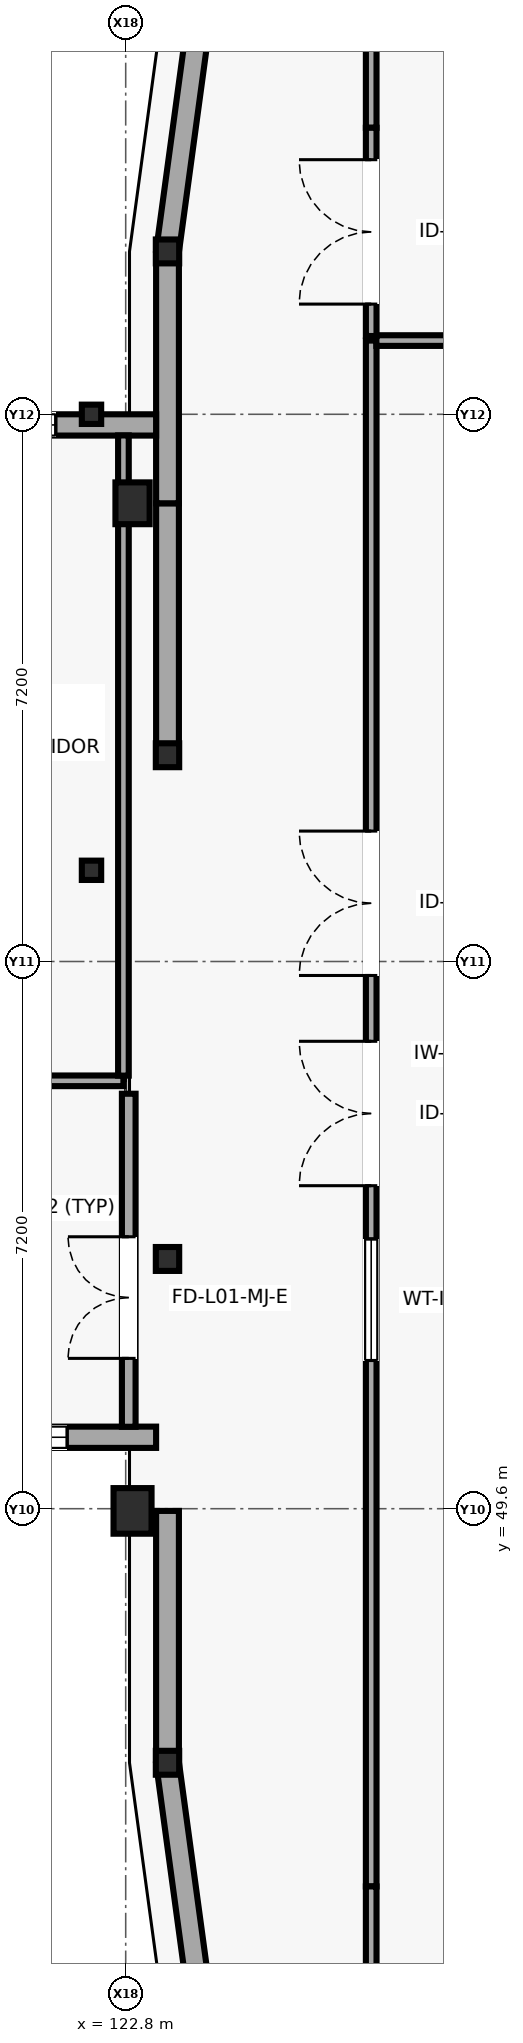
"""IFC4 building model, lengths in metres.
Left out: names, types, materials, properties, quantities, classifications, styles, units other than length and angle.
Written with IfcOpenShell. Run it as: python <this file> out.ifc"""

import sys

from ifc_helpers import new_model, si_unit, direction, frame, frame_2d, origin, origin_2d, place, context, subcontext, project, spatial, rectangle, i_section, extrude, element, fill, save


model = new_model("IFC4")
c1 = context("Model", 3, precision=1e-05, world=origin(), true_north=direction((0.0, 1.0)))
c2 = subcontext(c1, "Body", "Model", "MODEL_VIEW")
j1 = project(units=[si_unit("LENGTHUNIT", "METRE"), si_unit("PLANEANGLEUNIT", "RADIAN")], contexts=[c1])
p1 = place(None, origin())
s1 = spatial("IfcSite", under=j1, at=p1, CompositionType="ELEMENT")
p2 = place(p1, origin())
s2 = spatial("IfcBuilding", under=s1, at=p2, CompositionType="ELEMENT")
p3 = place(p2, frame((0.0, 0.0, 4.2)))
s3 = spatial("IfcBuildingStorey", under=s2, at=p3, CompositionType="ELEMENT", Elevation=4.2)
for number, where, z_axis, x_axis in (
    (1, (122.35, 58.0, 0.0), (0.0, 0.0, 1.0), (1.0, 0.0, 0.0)),
    (2, (122.35, 64.0, 0.0), (0.0, 0.0, 1.0), (1.0, 0.0, 0.0)),
):
    element("IfcColumn", number, at=place(p3, frame(where, z_axis=z_axis, x_axis=x_axis)), inside=s3, PredefinedType="COLUMN", context=c2, shape_type="SweptSolid", body=[
        extrude(i_section(OverallWidth=0.255, OverallDepth=0.254, WebThickness=0.009, FlangeThickness=0.014, FilletRadius=0.013, at=origin_2d()), origin(), (0.0, 0.0, 1.0), 4.0),
    ])
p4 = place(p3, frame((122.89, 49.571, 0.0), z_axis=(0.0, 0.0, 1.0), x_axis=(1.0, 0.0, 0.0)))
e3 = element("IfcColumn", 3, at=p4, inside=s3, PredefinedType="PILASTER", context=c2, shape_type="SweptSolid", body=[
    extrude(rectangle(XDim=0.5, YDim=0.6, at=origin_2d()), origin(), (0.0, 0.0, 1.0), 4.0),
])
p5 = place(p3, frame((122.89, 62.829, 0.0), z_axis=(0.0, 0.0, 1.0), x_axis=(1.0, 0.0, 0.0)))
e4 = element("IfcColumn", 4, at=p5, inside=s3, PredefinedType="PILASTER", context=c2, shape_type="SweptSolid", body=[
    extrude(rectangle(XDim=0.45, YDim=0.55, at=origin_2d()), origin(), (0.0, 0.0, 1.0), 4.0),
])
for number, where, z_axis, x_axis in (
    (5, (123.35, 46.257, 0.0), (0.0, 0.0, 1.0), (1.0, 0.0, 0.0)),
    (6, (123.35, 52.886, 0.0), (0.0, 0.0, 1.0), (1.0, 0.0, 0.0)),
    (7, (123.35, 59.514, 0.0), (0.0, 0.0, 1.0), (1.0, 0.0, 0.0)),
    (8, (123.35, 66.143, 0.0), (0.0, 0.0, 1.0), (1.0, 0.0, 0.0)),
):
    element("IfcColumn", number, at=place(p3, frame(where, z_axis=z_axis, x_axis=x_axis)), inside=s3, PredefinedType="COLUMN", context=c2, shape_type="SweptSolid", body=[
        extrude(i_section(OverallWidth=0.307, OverallDepth=0.314, WebThickness=0.012, FlangeThickness=0.019, FilletRadius=0.015, at=origin_2d()), origin(), (0.0, 0.0, 1.0), 4.0),
    ])
p6 = place(p3, frame((123.35, 46.257, 0.0), z_axis=(0.0, 0.0, 1.0), x_axis=(0.134539839792, -0.990908185206, 0.0)))
e9 = element("IfcWall", 9, at=p6, inside=s3, PredefinedType="SOLIDWALL", context=c2, shape_type="SweptSolid", body=[
    extrude(rectangle(XDim=3.344, YDim=0.3, at=frame_2d((1.672, 0.0))), origin(), (0.0, 0.0, 1.0), 3.745),
])
p7 = place(p3, frame((123.35, 49.571, 0.0), z_axis=(0.0, 0.0, 1.0), x_axis=(0.0, -1.0, 0.0)))
e10 = element("IfcWall", 10, at=p7, inside=s3, PredefinedType="SOLIDWALL", context=c2, shape_type="SweptSolid", body=[
    extrude(rectangle(XDim=3.314, YDim=0.3, at=frame_2d((1.657, 0.0))), origin(), (0.0, 0.0, 1.0), 3.48),
])
p8 = place(p3, frame((123.35, 62.829, 0.0), z_axis=(0.0, 0.0, 1.0), x_axis=(0.0, -1.0, 0.0)))
e11 = element("IfcWall", 11, at=p8, inside=s3, PredefinedType="SOLIDWALL", context=c2, shape_type="SweptSolid", body=[
    extrude(rectangle(XDim=3.315, YDim=0.3, at=frame_2d((1.658, 0.0))), origin(), (0.0, 0.0, 1.0), 3.48),
])
p9 = place(p3, frame((123.35, 66.143, 0.0), z_axis=(0.0, 0.0, 1.0), x_axis=(0.0, -1.0, 0.0)))
e12 = element("IfcWall", 12, at=p9, inside=s3, PredefinedType="SOLIDWALL", context=c2, shape_type="SweptSolid", body=[
    extrude(rectangle(XDim=3.314, YDim=0.3, at=frame_2d((1.657, 0.0))), origin(), (0.0, 0.0, 1.0), 3.48),
])
p10 = place(p3, frame((123.8, 69.457, 0.0), z_axis=(0.0, 0.0, 1.0), x_axis=(-0.134539839792, -0.990908185206, 0.0)))
e13 = element("IfcWall", 13, at=p10, inside=s3, PredefinedType="SOLIDWALL", context=c2, shape_type="SweptSolid", body=[
    extrude(rectangle(XDim=3.344, YDim=0.3, at=frame_2d((1.672, 0.0))), origin(), (0.0, 0.0, 1.0), 3.735),
])
p11 = place(p3, frame((115.32, 50.54, 0.0), z_axis=(0.0, 0.0, 1.0), x_axis=(1.0, 0.0, 0.0)))
e14 = element("IfcWall", 14, at=p11, inside=s3, PredefinedType="SOLIDWALL", context=c2, shape_type="SweptSolid", body=[
    extrude(rectangle(XDim=7.88, YDim=0.28, at=frame_2d((3.94, 0.0))), origin(), (0.0, 0.0, 1.0), 3.78),
])
p12 = place(p11, frame((1.445, 0.0, 1.05)))
e15 = element("IfcOpeningElement", 15, at=p12, cuts=e14, PredefinedType="OPENING", context=c2, shape_type="SweptSolid", body=[
    extrude(rectangle(XDim=1.05, YDim=1.3, at=frame_2d((0.525, 0.65))), frame((0.0, 0.15, 0.0), z_axis=(0.0, -1.0, 0.0), x_axis=(1.0, 0.0, 0.0)), (0.0, 0.0, 1.0), 0.3),
])
p13 = place(p11, frame((5.11, 0.0, 1.05)))
e16 = element("IfcOpeningElement", 16, at=p13, cuts=e14, PredefinedType="OPENING", context=c2, shape_type="SweptSolid", body=[
    extrude(rectangle(XDim=1.6, YDim=1.35, at=frame_2d((0.8, 0.675))), frame((0.0, 0.15, 0.0), z_axis=(0.0, -1.0, 0.0), x_axis=(1.0, 0.0, 0.0)), (0.0, 0.0, 1.0), 0.3),
])
p14 = place(p3, frame((123.2, 63.86, 0.0), z_axis=(0.0, 0.0, 1.0), x_axis=(-1.0, 0.0, 0.0)))
e17 = element("IfcWall", 17, at=p14, inside=s3, PredefinedType="SOLIDWALL", context=c2, shape_type="SweptSolid", body=[
    extrude(rectangle(XDim=7.88, YDim=0.28, at=frame_2d((3.94, 0.0))), origin(), (0.0, 0.0, 1.0), 3.16),
])
p15 = place(p14, frame((1.32, 0.0, 1.05)))
e18 = element("IfcOpeningElement", 18, at=p15, cuts=e17, PredefinedType="OPENING", context=c2, shape_type="SweptSolid", body=[
    extrude(rectangle(XDim=2.2, YDim=1.35, at=frame_2d((1.1, 0.675))), frame((0.0, 0.15, 0.0), z_axis=(0.0, -1.0, 0.0), x_axis=(1.0, 0.0, 0.0)), (0.0, 0.0, 1.0), 0.3),
])
p16 = place(p14, frame((5.31, 0.0, 1.05)))
e19 = element("IfcOpeningElement", 19, at=p16, cuts=e17, PredefinedType="OPENING", context=c2, shape_type="SweptSolid", body=[
    extrude(rectangle(XDim=1.2, YDim=0.9, at=frame_2d((0.6, 0.45))), frame((0.0, 0.15, 0.0), z_axis=(0.0, -1.0, 0.0), x_axis=(1.0, 0.0, 0.0)), (0.0, 0.0, 1.0), 0.3),
])
p17 = place(p3, frame((122.84, 50.678, 0.0), z_axis=(0.0, 0.0, 1.0), x_axis=(0.0, 1.0, 0.0)))
e20 = element("IfcWall", 20, at=p17, inside=s3, PredefinedType="PARTITIONING", context=c2, shape_type="SweptSolid", body=[
    extrude(rectangle(XDim=4.382, YDim=0.18, at=frame_2d((2.191, 0.0))), origin(), (0.0, 0.0, 1.0), 3.78),
])
p18 = place(p17, frame((0.9, 0.0, 0.0)))
e21 = element("IfcOpeningElement", 21, at=p18, cuts=e20, PredefinedType="OPENING", context=c2, shape_type="SweptSolid", body=[
    extrude(rectangle(XDim=1.6, YDim=2.25, at=frame_2d((0.8, 1.125))), frame((0.0, 0.1, 0.0), z_axis=(0.0, -1.0, 0.0), x_axis=(1.0, 0.0, 0.0)), (0.0, 0.0, 1.0), 0.2),
])
p19 = place(p3, frame((126.03, 64.97, 0.0), z_axis=(0.0, 0.0, 1.0), x_axis=(0.0, -1.0, 0.0)))
e22 = element("IfcWall", 22, at=p19, inside=s3, PredefinedType="PARTITIONING", context=c2, shape_type="SweptSolid", body=[
    extrude(rectangle(XDim=20.34, YDim=0.14, at=frame_2d((10.17, 0.0))), origin(), (0.0, 0.0, 1.0), 3.78),
])
p20 = place(p19, frame((9.22, 0.0, 0.0)))
e23 = element("IfcOpeningElement", 23, at=p20, cuts=e22, PredefinedType="OPENING", context=c2, shape_type="SweptSolid", body=[
    extrude(rectangle(XDim=1.9, YDim=2.5, at=frame_2d((0.95, 1.25))), frame((0.0, 0.08, 0.0), z_axis=(0.0, -1.0, 0.0), x_axis=(1.0, 0.0, 0.0)), (0.0, 0.0, 1.0), 0.16),
])
p21 = place(p19, frame((6.454, 0.0, 0.0)))
e24 = element("IfcOpeningElement", 24, at=p21, cuts=e22, PredefinedType="OPENING", context=c2, shape_type="SweptSolid", body=[
    extrude(rectangle(XDim=1.9, YDim=2.5, at=frame_2d((0.95, 1.25))), frame((0.0, 0.08, 0.0), z_axis=(0.0, -1.0, 0.0), x_axis=(1.0, 0.0, 0.0)), (0.0, 0.0, 1.0), 0.16),
])
p22 = place(p19, frame((11.82, 0.0, 1.05)))
e25 = element("IfcOpeningElement", 25, at=p22, cuts=e22, PredefinedType="OPENING", context=c2, shape_type="SweptSolid", body=[
    extrude(rectangle(XDim=1.6, YDim=1.1, at=frame_2d((0.8, 0.55))), frame((0.0, 0.08, 0.0), z_axis=(0.0, -1.0, 0.0), x_axis=(1.0, 0.0, 0.0)), (0.0, 0.0, 1.0), 0.16),
])
p23 = place(p3, frame((126.03, 44.63, 0.0), z_axis=(0.0, 0.0, 1.0), x_axis=(0.0, -1.0, 0.0)))
e26 = element("IfcWall", 26, at=p23, inside=s3, PredefinedType="PARTITIONING", context=c2, shape_type="SweptSolid", body=[
    extrude(rectangle(XDim=8.664, YDim=0.14, at=frame_2d((4.332, 0.0))), origin(), (0.0, 0.0, 1.0), 3.78),
])
p24 = place(p3, frame((155.33, 64.97, 0.0), z_axis=(0.0, 0.0, 1.0), x_axis=(-1.0, 0.0, 0.0)))
e27 = element("IfcWall", 27, at=p24, inside=s3, PredefinedType="PARTITIONING", context=c2, shape_type="SweptSolid", body=[
    extrude(rectangle(XDim=29.232, YDim=0.14, at=frame_2d((14.616, 0.0))), origin(), (0.0, 0.0, 1.0), 3.78),
])
p25 = place(p3, frame((126.03, 76.434, 0.0), z_axis=(0.0, 0.0, 1.0), x_axis=(0.0, -1.0, 0.0)))
e28 = element("IfcWall", 28, at=p25, inside=s3, PredefinedType="PARTITIONING", context=c2, shape_type="SweptSolid", body=[
    extrude(rectangle(XDim=8.664, YDim=0.14, at=frame_2d((4.332, 0.0))), origin(), (0.0, 0.0, 1.0), 3.78),
])
p26 = place(p3, frame((126.03, 67.77, 0.0), z_axis=(0.0, 0.0, 1.0), x_axis=(0.0, -1.0, 0.0)))
e29 = element("IfcWall", 29, at=p26, inside=s3, PredefinedType="PARTITIONING", context=c2, shape_type="SweptSolid", body=[
    extrude(rectangle(XDim=2.74, YDim=0.14, at=frame_2d((1.37, 0.0))), origin(), (0.0, 0.0, 1.0), 3.78),
])
p27 = place(p26, frame((0.42, 0.0, 0.0)))
e30 = element("IfcOpeningElement", 30, at=p27, cuts=e29, PredefinedType="OPENING", context=c2, shape_type="SweptSolid", body=[
    extrude(rectangle(XDim=1.9, YDim=2.5, at=frame_2d((0.95, 1.25))), frame((0.0, 0.08, 0.0), z_axis=(0.0, -1.0, 0.0), x_axis=(1.0, 0.0, 0.0)), (0.0, 0.0, 1.0), 0.16),
])
p28 = place(p3, frame((115.63, 55.23, 0.0), z_axis=(0.0, 0.0, 1.0), x_axis=(1.0, 0.0, 0.0)))
e31 = element("IfcWall", 31, at=p28, inside=s3, PredefinedType="PARTITIONING", context=c2, shape_type="SweptSolid", body=[
    extrude(rectangle(XDim=7.14, YDim=0.14, at=frame_2d((3.57, 0.0))), origin(), (0.0, 0.0, 1.0), 3.76),
])
p29 = place(p3, frame((122.77, 55.298, 0.0), z_axis=(0.0, 0.0, 1.0), x_axis=(0.0, 1.0, 0.0)))
e32 = element("IfcWall", 32, at=p29, inside=s3, PredefinedType="PARTITIONING", context=c2, shape_type="SweptSolid", body=[
    extrude(rectangle(XDim=8.424, YDim=0.14, at=frame_2d((4.212, 0.0))), origin(), (0.0, 0.0, 1.0), 3.76),
])
p30 = place(p13, origin())
e33 = element("IfcWindow", 33, at=p30, inside=s3, PartitioningType="SINGLE_PANEL", PredefinedType="WINDOW", context=c2, shape_type="SweptSolid", body=[
    extrude(rectangle(XDim=1.6, YDim=1.35, at=frame_2d((0.8, 0.675))), frame((0.0, 0.03, 0.0), z_axis=(0.0, -1.0, 0.0), x_axis=(1.0, 0.0, 0.0)), (0.0, 0.0, 1.0), 0.06),
])
fill(e16, e33)
p31 = place(p15, origin())
e34 = element("IfcWindow", 34, at=p31, inside=s3, PartitioningType="SINGLE_PANEL", PredefinedType="WINDOW", context=c2, shape_type="SweptSolid", body=[
    extrude(rectangle(XDim=2.2, YDim=1.35, at=frame_2d((1.1, 0.675))), frame((0.0, 0.03, 0.0), z_axis=(0.0, -1.0, 0.0), x_axis=(1.0, 0.0, 0.0)), (0.0, 0.0, 1.0), 0.06),
])
fill(e18, e34)
p32 = place(p18, origin())
e35 = element("IfcDoor", 35, at=p32, inside=s3, OperationType="DOUBLE_DOOR_SINGLE_SWING", PredefinedType="DOOR", context=c2, shape_type="SweptSolid", body=[
    extrude(rectangle(XDim=1.6, YDim=2.25, at=frame_2d((0.8, 1.125))), frame((0.0, 0.025, 0.0), z_axis=(0.0, -1.0, 0.0), x_axis=(1.0, 0.0, 0.0)), (0.0, 0.0, 1.0), 0.05),
])
fill(e21, e35)
p33 = place(p20, frame((1.9, 0.0, 0.0), z_axis=(0.0, 0.0, 1.0), x_axis=(-1.0, 0.0, 0.0)))
e36 = element("IfcDoor", 36, at=p33, inside=s3, OperationType="DOUBLE_DOOR_SINGLE_SWING", PredefinedType="DOOR", context=c2, shape_type="SweptSolid", body=[
    extrude(rectangle(XDim=1.9, YDim=2.5, at=frame_2d((0.95, 1.25))), frame((0.0, 0.025, 0.0), z_axis=(0.0, -1.0, 0.0), x_axis=(1.0, 0.0, 0.0)), (0.0, 0.0, 1.0), 0.05),
])
fill(e23, e36)
p34 = place(p21, frame((1.9, 0.0, 0.0), z_axis=(0.0, 0.0, 1.0), x_axis=(-1.0, 0.0, 0.0)))
e37 = element("IfcDoor", 37, at=p34, inside=s3, OperationType="DOUBLE_DOOR_SINGLE_SWING", PredefinedType="DOOR", context=c2, shape_type="SweptSolid", body=[
    extrude(rectangle(XDim=1.9, YDim=2.5, at=frame_2d((0.95, 1.25))), frame((0.0, 0.025, 0.0), z_axis=(0.0, -1.0, 0.0), x_axis=(1.0, 0.0, 0.0)), (0.0, 0.0, 1.0), 0.05),
])
fill(e24, e37)
p35 = place(p22, origin())
e38 = element("IfcWindow", 38, at=p35, inside=s3, PartitioningType="SINGLE_PANEL", PredefinedType="WINDOW", context=c2, shape_type="SweptSolid", body=[
    extrude(rectangle(XDim=1.6, YDim=1.1, at=frame_2d((0.8, 0.55))), frame((0.0, 0.03, 0.0), z_axis=(0.0, -1.0, 0.0), x_axis=(1.0, 0.0, 0.0)), (0.0, 0.0, 1.0), 0.06),
])
fill(e25, e38)
p36 = place(p27, frame((1.9, 0.0, 0.0), z_axis=(0.0, 0.0, 1.0), x_axis=(-1.0, 0.0, 0.0)))
e39 = element("IfcDoor", 39, at=p36, inside=s3, OperationType="DOUBLE_DOOR_SINGLE_SWING", PredefinedType="DOOR", context=c2, shape_type="SweptSolid", body=[
    extrude(rectangle(XDim=1.9, YDim=2.5, at=frame_2d((0.95, 1.25))), frame((0.0, 0.025, 0.0), z_axis=(0.0, -1.0, 0.0), x_axis=(1.0, 0.0, 0.0)), (0.0, 0.0, 1.0), 0.05),
])
fill(e30, e39)
save(model, sys.argv[1])
